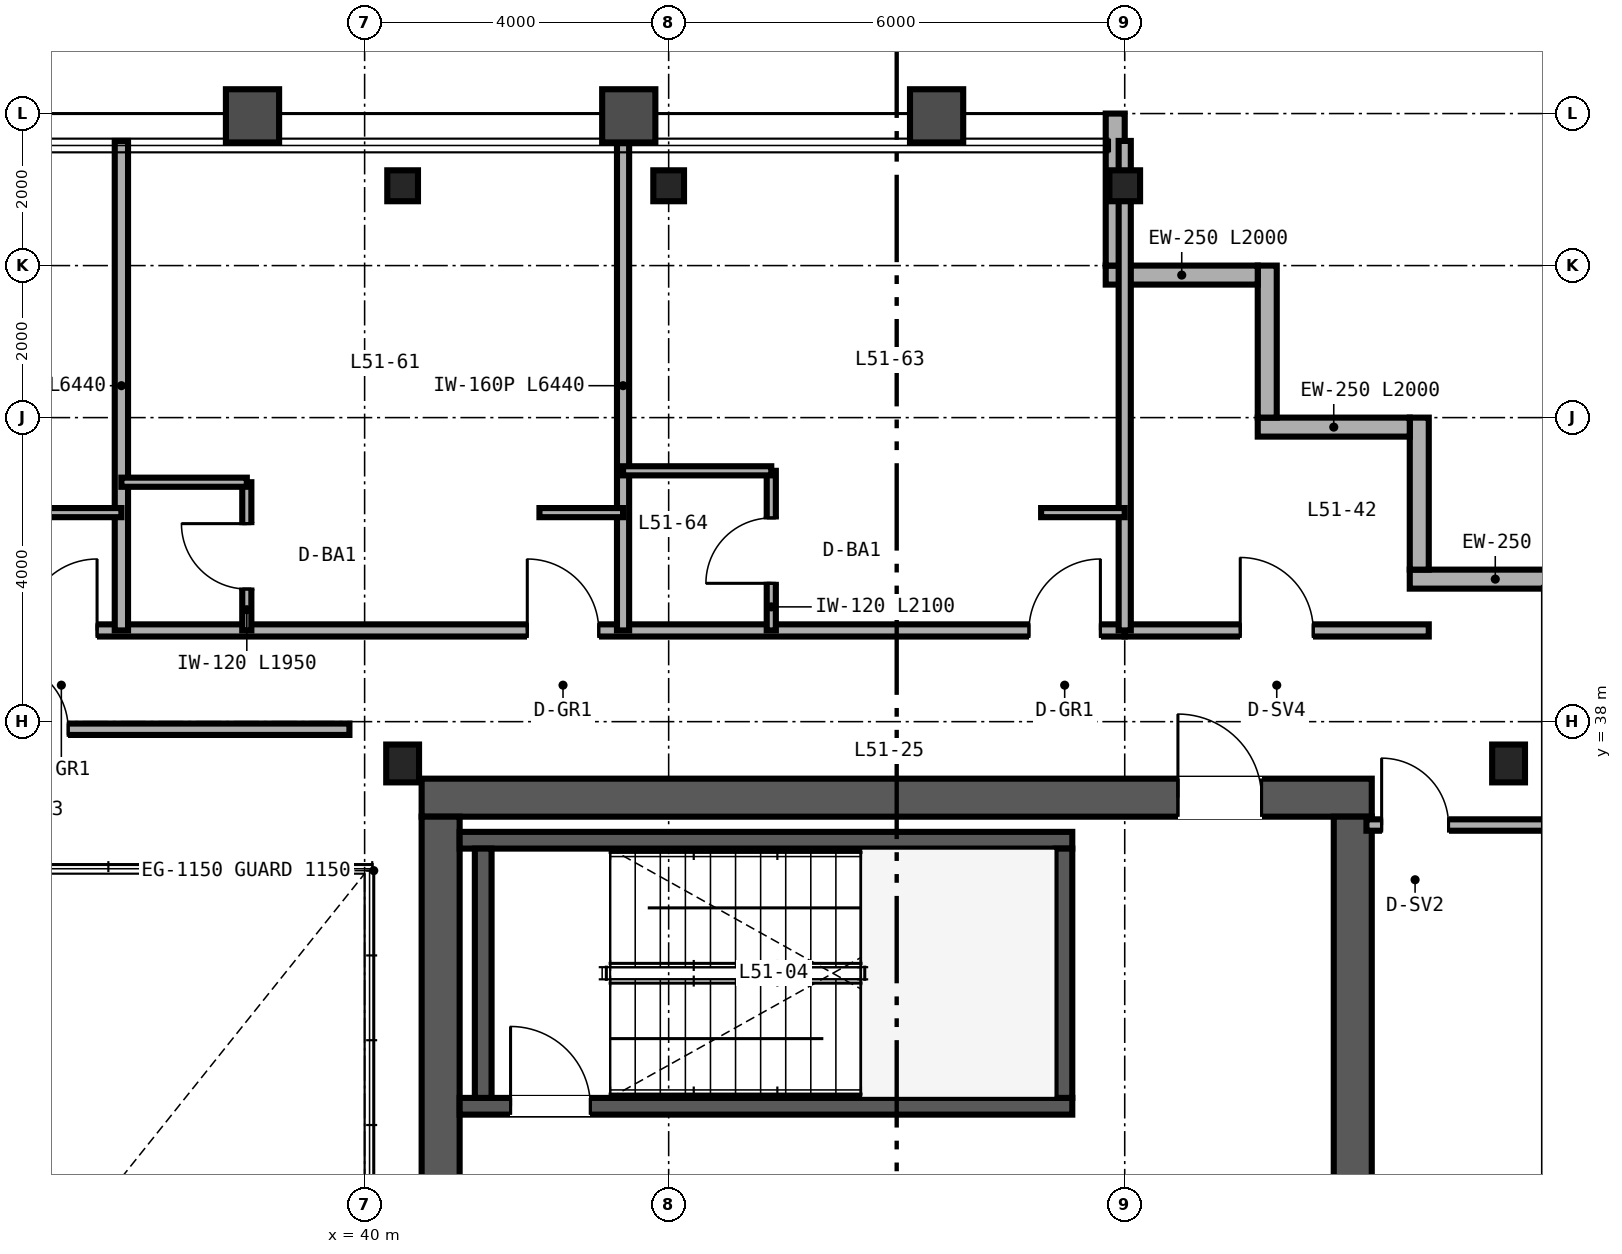
"""IFC4 building model, lengths in metres.
Left out: names, types, materials, properties, quantities, classifications, styles, units other than length and angle.
Written with IfcOpenShell. Run it as: python <this file> out.ifc"""

import sys

from ifc_helpers import new_model, si_unit, direction, frame, frame_2d, origin, origin_2d, place, context, subcontext, project, spatial, rectangle, i_section, extrude, source, transform, mapped, element, fill, save


model = new_model("IFC4")
c1 = context("Model", 3, precision=1e-05, world=origin(), true_north=direction((0.0, 1.0)))
c2 = subcontext(c1, "Body", "Model", "MODEL_VIEW")
j1 = project(units=[si_unit("LENGTHUNIT", "METRE"), si_unit("PLANEANGLEUNIT", "RADIAN")], contexts=[c1])
p1 = place(None, origin())
s1 = spatial("IfcSite", under=j1, at=p1, CompositionType="ELEMENT")
p2 = place(p1, origin())
s2 = spatial("IfcBuilding", under=s1, at=p2, CompositionType="ELEMENT")
p3 = place(p2, frame((0.0, 0.0, 202.8)))
s3 = spatial("IfcBuildingStorey", under=s2, at=p3, CompositionType="ELEMENT", Elevation=202.8)
p4 = place(p3, frame((40.75, 37.0, 0.0), z_axis=(0.0, 0.0, 1.0), x_axis=(1.0, 0.0, 0.0)))
e1 = element("IfcWall", 1, at=p4, inside=s3, PredefinedType="SHEAR", context=c2, shape_type="SweptSolid", body=[
    extrude(rectangle(XDim=12.5, YDim=0.5, at=frame_2d((6.25, 0.0))), origin(), (0.0, 0.0, 1.0), 3.37),
])
p5 = place(p4, frame((9.95, 0.0, 0.0)))
e2 = element("IfcOpeningElement", 2, at=p5, cuts=e1, PredefinedType="OPENING", context=c2, shape_type="SweptSolid", body=[
    extrude(rectangle(XDim=1.1, YDim=2.15, at=frame_2d((0.55, 1.075))), frame((0.0, 0.26, 0.0), z_axis=(0.0, -1.0, 0.0), x_axis=(1.0, 0.0, 0.0)), (0.0, 0.0, 1.0), 0.52),
])
for number, where, z_axis, x_axis in (
    (3, (41.0, 15.25, 0.0), (0.0, 0.0, 1.0), (0.0, 1.0, 0.0)),
    (4, (53.0, 15.25, 0.0), (0.0, 0.0, 1.0), (0.0, 1.0, 0.0)),
):
    element("IfcWall", number, at=place(p3, frame(where, z_axis=z_axis, x_axis=x_axis)), inside=s3, PredefinedType="SHEAR", context=c2, shape_type="SweptSolid", body=[
        extrude(rectangle(XDim=21.5, YDim=0.5, at=frame_2d((10.75, 0.0))), origin(), (0.0, 0.0, 1.0), 3.37),
    ])
p6 = place(p3, frame((41.25, 32.94, 0.0), z_axis=(0.0, 0.0, 1.0), x_axis=(1.0, 0.0, 0.0)))
e5 = element("IfcWall", 5, at=p6, inside=s3, PredefinedType="SHEAR", context=c2, shape_type="SweptSolid", body=[
    extrude(rectangle(XDim=8.06, YDim=0.22, at=frame_2d((4.03, 0.0))), origin(), (0.0, 0.0, 1.0), 3.4),
])
p7 = place(p6, frame((0.67, 0.0, 0.0)))
e6 = element("IfcOpeningElement", 6, at=p7, cuts=e5, PredefinedType="OPENING", context=c2, shape_type="SweptSolid", body=[
    extrude(rectangle(XDim=1.05, YDim=2.15, at=frame_2d((0.525, 1.075))), frame((0.0, 0.12, 0.0), z_axis=(0.0, -1.0, 0.0), x_axis=(1.0, 0.0, 0.0)), (0.0, 0.0, 1.0), 0.24),
])
p8 = place(p3, frame((41.25, 36.44, 0.0), z_axis=(0.0, 0.0, 1.0), x_axis=(1.0, 0.0, 0.0)))
e7 = element("IfcWall", 7, at=p8, inside=s3, PredefinedType="SHEAR", context=c2, shape_type="SweptSolid", body=[
    extrude(rectangle(XDim=8.06, YDim=0.22, at=frame_2d((4.03, 0.0))), origin(), (0.0, 0.0, 1.0), 3.4),
])
for number, where, z_axis, x_axis in (
    (8, (41.56, 33.05, 0.0), (0.0, 0.0, 1.0), (0.0, 1.0, 0.0)),
    (9, (49.2, 33.05, 0.0), (0.0, 0.0, 1.0), (0.0, 1.0, 0.0)),
):
    element("IfcWall", number, at=place(p3, frame(where, z_axis=z_axis, x_axis=x_axis)), inside=s3, PredefinedType="SHEAR", context=c2, shape_type="SweptSolid", body=[
        extrude(rectangle(XDim=3.28, YDim=0.22, at=frame_2d((1.64, 0.0))), origin(), (0.0, 0.0, 1.0), 3.4),
    ])
m1 = source(origin(), c2, "Body", "SweptSolid", [
    extrude(i_section(OverallWidth=0.432, OverallDepth=0.498, WebThickness=0.056, FlangeThickness=0.089, FilletRadius=0.025, at=origin_2d()), origin(), (0.0, 0.0, 1.0), 3.37),
])
for number, where, z_axis, x_axis in (
    (10, (40.5, 37.45, 0.0), (0.0, 0.0, 1.0), (1.0, 0.0, 0.0)),
    (11, (55.05, 37.45, 0.0), (0.0, 0.0, 1.0), (1.0, 0.0, 0.0)),
):
    element("IfcColumn", number, at=place(p3, frame(where, z_axis=z_axis, x_axis=x_axis)), inside=s3, PredefinedType="COLUMN", context=c2, shape_type="MappedRepresentation", body=[
        mapped(m1, transform((0.0, 0.0, 0.0), scale=1.0)),
    ])
m2 = source(origin(), c2, "Body", "SweptSolid", [
    extrude(i_section(OverallWidth=0.404, OverallDepth=0.407, WebThickness=0.027, FlangeThickness=0.044, FilletRadius=0.025, at=origin_2d()), origin(), (0.0, 0.0, 1.0), 3.37),
])
for number, where, z_axis, x_axis in (
    (12, (40.5, 45.05, 0.0), (0.0, 0.0, 1.0), (1.0, 0.0, 0.0)),
    (13, (44.0, 45.05, 0.0), (0.0, 0.0, 1.0), (1.0, 0.0, 0.0)),
    (14, (50.0, 45.05, 0.0), (0.0, 0.0, 1.0), (1.0, 0.0, 0.0)),
):
    element("IfcColumn", number, at=place(p3, frame(where, z_axis=z_axis, x_axis=x_axis)), inside=s3, PredefinedType="COLUMN", context=c2, shape_type="MappedRepresentation", body=[
        mapped(m2, transform((0.0, 0.0, 0.0), scale=1.0)),
    ])
p9 = place(p3, frame((56.0, 39.875, 0.0), z_axis=(0.0, 0.0, 1.0), x_axis=(-1.0, 0.0, 0.0)))
e15 = element("IfcWall", 15, at=p9, inside=s3, PredefinedType="SOLIDWALL", context=c2, shape_type="SweptSolid", body=[
    extrude(rectangle(XDim=2.25, YDim=0.25, at=frame_2d((1.125, 0.0))), origin(), (0.0, 0.0, 1.0), 3.37),
])
for number, where, z_axis, x_axis in (
    (16, (53.875, 40.0, 0.0), (0.0, 0.0, 1.0), (0.0, 1.0, 0.0)),
    (17, (53.75, 41.875, 0.0), (0.0, 0.0, 1.0), (-1.0, 0.0, 0.0)),
    (18, (51.875, 42.0, 0.0), (0.0, 0.0, 1.0), (0.0, 1.0, 0.0)),
    (19, (51.75, 43.875, 0.0), (0.0, 0.0, 1.0), (-1.0, 0.0, 0.0)),
):
    element("IfcWall", number, at=place(p3, frame(where, z_axis=z_axis, x_axis=x_axis)), inside=s3, PredefinedType="SOLIDWALL", context=c2, shape_type="SweptSolid", body=[
        extrude(rectangle(XDim=2.0, YDim=0.25, at=frame_2d((1.0, 0.0))), origin(), (0.0, 0.0, 1.0), 3.37),
    ])
p10 = place(p3, frame((49.875, 44.0, 0.0), z_axis=(0.0, 0.0, 1.0), x_axis=(0.0, 1.0, 0.0)))
e20 = element("IfcWall", 20, at=p10, inside=s3, PredefinedType="SOLIDWALL", context=c2, shape_type="SweptSolid", body=[
    extrude(rectangle(XDim=2.0, YDim=0.25, at=frame_2d((1.0, 0.0))), origin(), (0.0, 0.0, 1.0), 2.677),
])
p11 = place(p3, frame((24.2, 37.9, 0.0), z_axis=(0.0, 0.0, 1.0), x_axis=(1.0, 0.0, 0.0)))
e21 = element("IfcWall", 21, at=p11, inside=s3, PredefinedType="PARTITIONING", context=c2, shape_type="SweptSolid", body=[
    extrude(rectangle(XDim=15.6, YDim=0.15, at=frame_2d((7.8, 0.0))), origin(), (0.0, 0.0, 1.0), 3.37),
])
p12 = place(p11, frame((3.0, 0.0, 0.0)))
e22 = element("IfcOpeningElement", 22, at=p12, cuts=e21, PredefinedType="OPENING", context=c2, shape_type="SweptSolid", body=[
    extrude(rectangle(XDim=0.9, YDim=2.15, at=frame_2d((0.45, 1.075))), frame((0.0, 0.085, 0.0), z_axis=(0.0, -1.0, 0.0), x_axis=(1.0, 0.0, 0.0)), (0.0, 0.0, 1.0), 0.17),
])
p13 = place(p11, frame((11.0, 0.0, 0.0)))
e23 = element("IfcOpeningElement", 23, at=p13, cuts=e21, PredefinedType="OPENING", context=c2, shape_type="SweptSolid", body=[
    extrude(rectangle(XDim=0.9, YDim=2.15, at=frame_2d((0.45, 1.075))), frame((0.0, 0.085, 0.0), z_axis=(0.0, -1.0, 0.0), x_axis=(1.0, 0.0, 0.0)), (0.0, 0.0, 1.0), 0.17),
])
p14 = place(p3, frame((53.18, 36.64, 0.0), z_axis=(0.0, 0.0, 1.0), x_axis=(1.0, 0.0, 0.0)))
e24 = element("IfcWall", 24, at=p14, inside=s3, PredefinedType="PARTITIONING", context=c2, shape_type="SweptSolid", body=[
    extrude(rectangle(XDim=2.66, YDim=0.15, at=frame_2d((1.33, 0.0))), origin(), (0.0, 0.0, 1.0), 2.753),
])
p15 = place(p14, frame((0.2, 0.0, 0.0)))
e25 = element("IfcOpeningElement", 25, at=p15, cuts=e24, PredefinedType="OPENING", context=c2, shape_type="SweptSolid", body=[
    extrude(rectangle(XDim=0.88, YDim=2.15, at=frame_2d((0.44, 1.075))), frame((0.0, 0.085, 0.0), z_axis=(0.0, -1.0, 0.0), x_axis=(1.0, 0.0, 0.0)), (0.0, 0.0, 1.0), 0.17),
])
p16 = place(p3, frame((50.0, 39.2, 0.0), z_axis=(0.0, 0.0, 1.0), x_axis=(1.0, 0.0, 0.0)))
e26 = element("IfcWall", 26, at=p16, inside=s3, PredefinedType="PARTITIONING", context=c2, shape_type="SweptSolid", body=[
    extrude(rectangle(XDim=4.0, YDim=0.16, at=frame_2d((2.0, 0.0))), origin(), (0.0, 0.0, 1.0), 3.37),
])
p17 = place(p16, frame((1.52, 0.0, 0.0)))
e27 = element("IfcOpeningElement", 27, at=p17, cuts=e26, PredefinedType="OPENING", context=c2, shape_type="SweptSolid", body=[
    extrude(rectangle(XDim=0.96, YDim=2.15, at=frame_2d((0.48, 1.075))), frame((0.0, 0.09, 0.0), z_axis=(0.0, -1.0, 0.0), x_axis=(1.0, 0.0, 0.0)), (0.0, 0.0, 1.0), 0.18),
])
p18 = place(p3, frame((14.0, 39.2, 0.0), z_axis=(0.0, 0.0, 1.0), x_axis=(1.0, 0.0, 0.0)))
e28 = element("IfcWall", 28, at=p18, inside=s3, PredefinedType="PARTITIONING", context=c2, shape_type="SweptSolid", body=[
    extrude(rectangle(XDim=36.0, YDim=0.16, at=frame_2d((18.0, 0.0))), origin(), (0.0, 0.0, 1.0), 2.913),
])
p19 = place(p18, frame((4.14, 0.0, 0.0)))
e29 = element("IfcOpeningElement", 29, at=p19, cuts=e28, PredefinedType="OPENING", context=c2, shape_type="SweptSolid", body=[
    extrude(rectangle(XDim=0.94, YDim=2.15, at=frame_2d((0.47, 1.075))), frame((0.0, 0.09, 0.0), z_axis=(0.0, -1.0, 0.0), x_axis=(1.0, 0.0, 0.0)), (0.0, 0.0, 1.0), 0.18),
])
p20 = place(p18, frame((9.54, 0.0, 0.0)))
e30 = element("IfcOpeningElement", 30, at=p20, cuts=e28, PredefinedType="OPENING", context=c2, shape_type="SweptSolid", body=[
    extrude(rectangle(XDim=0.94, YDim=2.15, at=frame_2d((0.47, 1.075))), frame((0.0, 0.09, 0.0), z_axis=(0.0, -1.0, 0.0), x_axis=(1.0, 0.0, 0.0)), (0.0, 0.0, 1.0), 0.18),
])
p21 = place(p18, frame((13.32, 0.0, 0.0)))
e31 = element("IfcOpeningElement", 31, at=p21, cuts=e28, PredefinedType="OPENING", context=c2, shape_type="SweptSolid", body=[
    extrude(rectangle(XDim=0.96, YDim=2.15, at=frame_2d((0.48, 1.075))), frame((0.0, 0.09, 0.0), z_axis=(0.0, -1.0, 0.0), x_axis=(1.0, 0.0, 0.0)), (0.0, 0.0, 1.0), 0.18),
])
p22 = place(p18, frame((21.54, 0.0, 0.0)))
e32 = element("IfcOpeningElement", 32, at=p22, cuts=e28, PredefinedType="OPENING", context=c2, shape_type="SweptSolid", body=[
    extrude(rectangle(XDim=0.94, YDim=2.15, at=frame_2d((0.47, 1.075))), frame((0.0, 0.09, 0.0), z_axis=(0.0, -1.0, 0.0), x_axis=(1.0, 0.0, 0.0)), (0.0, 0.0, 1.0), 0.18),
])
p23 = place(p18, frame((28.14, 0.0, 0.0)))
e33 = element("IfcOpeningElement", 33, at=p23, cuts=e28, PredefinedType="OPENING", context=c2, shape_type="SweptSolid", body=[
    extrude(rectangle(XDim=0.94, YDim=2.15, at=frame_2d((0.47, 1.075))), frame((0.0, 0.09, 0.0), z_axis=(0.0, -1.0, 0.0), x_axis=(1.0, 0.0, 0.0)), (0.0, 0.0, 1.0), 0.18),
])
p24 = place(p18, frame((34.74, 0.0, 0.0)))
e34 = element("IfcOpeningElement", 34, at=p24, cuts=e28, PredefinedType="OPENING", context=c2, shape_type="SweptSolid", body=[
    extrude(rectangle(XDim=0.94, YDim=2.15, at=frame_2d((0.47, 1.075))), frame((0.0, 0.09, 0.0), z_axis=(0.0, -1.0, 0.0), x_axis=(1.0, 0.0, 0.0)), (0.0, 0.0, 1.0), 0.18),
])
p25 = place(p3, frame((50.0, 39.2, 0.0), z_axis=(0.0, 0.0, 1.0), x_axis=(0.0, 1.0, 0.0)))
e35 = element("IfcWall", 35, at=p25, inside=s3, PredefinedType="PARTITIONING", context=c2, shape_type="SweptSolid", body=[
    extrude(rectangle(XDim=6.44, YDim=0.16, at=frame_2d((3.22, 0.0))), origin(), (0.0, 0.0, 1.0), 2.677),
])
p26 = place(p3, frame((36.8, 39.2, 0.0), z_axis=(0.0, 0.0, 1.0), x_axis=(0.0, 1.0, 0.0)))
e36 = element("IfcWall", 36, at=p26, inside=s3, PredefinedType="PARTITIONING", context=c2, shape_type="SweptSolid", body=[
    extrude(rectangle(XDim=6.44, YDim=0.175, at=frame_2d((3.22, 0.0))), origin(), (0.0, 0.0, 1.0), 2.443),
])
p27 = place(p3, frame((35.7, 40.75, 0.0), z_axis=(0.0, 0.0, 1.0), x_axis=(1.0, 0.0, 0.0)))
e37 = element("IfcWall", 37, at=p27, inside=s3, PredefinedType="PARTITIONING", context=c2, shape_type="SweptSolid", body=[
    extrude(rectangle(XDim=1.1, YDim=0.12, at=frame_2d((0.55, 0.0))), origin(), (0.0, 0.0, 1.0), 3.37),
])
p28 = place(p3, frame((43.4, 39.2, 0.0), z_axis=(0.0, 0.0, 1.0), x_axis=(0.0, 1.0, 0.0)))
e38 = element("IfcWall", 38, at=p28, inside=s3, PredefinedType="PARTITIONING", context=c2, shape_type="SweptSolid", body=[
    extrude(rectangle(XDim=6.44, YDim=0.16, at=frame_2d((3.22, 0.0))), origin(), (0.0, 0.0, 1.0), 2.833),
])
p29 = place(p3, frame((38.45, 39.2, 0.0), z_axis=(0.0, 0.0, 1.0), x_axis=(0.0, 1.0, 0.0)))
e39 = element("IfcWall", 39, at=p29, inside=s3, PredefinedType="PARTITIONING", context=c2, shape_type="SweptSolid", body=[
    extrude(rectangle(XDim=1.95, YDim=0.12, at=frame_2d((0.975, 0.0))), origin(), (0.0, 0.0, 1.0), 3.37),
])
p30 = place(p29, frame((0.545, 0.0, 0.0)))
e40 = element("IfcOpeningElement", 40, at=p30, cuts=e39, PredefinedType="OPENING", context=c2, shape_type="SweptSolid", body=[
    extrude(rectangle(XDim=0.86, YDim=2.1, at=frame_2d((0.43, 1.05))), frame((0.0, 0.07, 0.0), z_axis=(0.0, -1.0, 0.0), x_axis=(1.0, 0.0, 0.0)), (0.0, 0.0, 1.0), 0.14),
])
p31 = place(p3, frame((36.8, 41.15, 0.0), z_axis=(0.0, 0.0, 1.0), x_axis=(1.0, 0.0, 0.0)))
e41 = element("IfcWall", 41, at=p31, inside=s3, PredefinedType="PARTITIONING", context=c2, shape_type="SweptSolid", body=[
    extrude(rectangle(XDim=1.65, YDim=0.12, at=frame_2d((0.825, 0.0))), origin(), (0.0, 0.0, 1.0), 3.37),
])
p32 = place(p3, frame((42.3, 40.75, 0.0), z_axis=(0.0, 0.0, 1.0), x_axis=(1.0, 0.0, 0.0)))
e42 = element("IfcWall", 42, at=p32, inside=s3, PredefinedType="PARTITIONING", context=c2, shape_type="SweptSolid", body=[
    extrude(rectangle(XDim=1.1, YDim=0.12, at=frame_2d((0.55, 0.0))), origin(), (0.0, 0.0, 1.0), 3.37),
])
p33 = place(p3, frame((45.35, 39.2, 0.0), z_axis=(0.0, 0.0, 1.0), x_axis=(0.0, 1.0, 0.0)))
e43 = element("IfcWall", 43, at=p33, inside=s3, PredefinedType="PARTITIONING", context=c2, shape_type="SweptSolid", body=[
    extrude(rectangle(XDim=2.1, YDim=0.12, at=frame_2d((1.05, 0.0))), origin(), (0.0, 0.0, 1.0), 3.37),
])
p34 = place(p33, frame((0.62, 0.0, 0.0)))
e44 = element("IfcOpeningElement", 44, at=p34, cuts=e43, PredefinedType="OPENING", context=c2, shape_type="SweptSolid", body=[
    extrude(rectangle(XDim=0.86, YDim=2.1, at=frame_2d((0.43, 1.05))), frame((0.0, 0.07, 0.0), z_axis=(0.0, -1.0, 0.0), x_axis=(1.0, 0.0, 0.0)), (0.0, 0.0, 1.0), 0.14),
])
p35 = place(p3, frame((43.4, 41.3, 0.0), z_axis=(0.0, 0.0, 1.0), x_axis=(1.0, 0.0, 0.0)))
e45 = element("IfcWall", 45, at=p35, inside=s3, PredefinedType="PARTITIONING", context=c2, shape_type="SweptSolid", body=[
    extrude(rectangle(XDim=1.95, YDim=0.12, at=frame_2d((0.975, 0.0))), origin(), (0.0, 0.0, 1.0), 3.37),
])
p36 = place(p3, frame((48.9, 40.75, 0.0), z_axis=(0.0, 0.0, 1.0), x_axis=(1.0, 0.0, 0.0)))
e46 = element("IfcWall", 46, at=p36, inside=s3, PredefinedType="PARTITIONING", context=c2, shape_type="SweptSolid", body=[
    extrude(rectangle(XDim=1.1, YDim=0.12, at=frame_2d((0.55, 0.0))), origin(), (0.0, 0.0, 1.0), 3.37),
])
m3 = source(origin(), c2, "Body", "SweptSolid", [
    extrude(rectangle(XDim=1.05, YDim=2.15, at=frame_2d((0.525, 1.075))), frame((0.0, 0.025, 0.0), z_axis=(0.0, -1.0, 0.0), x_axis=(1.0, 0.0, 0.0)), (0.0, 0.0, 1.0), 0.05),
])
p37 = place(p7, origin())
e47 = element("IfcDoor", 47, at=p37, inside=s3, OperationType="SINGLE_SWING_LEFT", PredefinedType="DOOR", context=c2, shape_type="MappedRepresentation", body=[
    mapped(m3, transform((0.0, 0.0, 0.0), scale=1.0)),
])
fill(e6, e47)
m4 = source(origin(), c2, "Body", "SweptSolid", [
    extrude(rectangle(XDim=1.1, YDim=2.15, at=frame_2d((0.55, 1.075))), frame((0.0, 0.025, 0.0), z_axis=(0.0, -1.0, 0.0), x_axis=(1.0, 0.0, 0.0)), (0.0, 0.0, 1.0), 0.05),
])
p38 = place(p5, origin())
e48 = element("IfcDoor", 48, at=p38, inside=s3, OperationType="SINGLE_SWING_LEFT", PredefinedType="DOOR", context=c2, shape_type="MappedRepresentation", body=[
    mapped(m4, transform((0.0, 0.0, 0.0), scale=1.0)),
])
fill(e2, e48)
m5 = source(origin(), c2, "Body", "SweptSolid", [
    extrude(rectangle(XDim=0.9, YDim=2.15, at=frame_2d((0.45, 1.075))), frame((0.0, 0.025, 0.0), z_axis=(0.0, -1.0, 0.0), x_axis=(1.0, 0.0, 0.0)), (0.0, 0.0, 1.0), 0.05),
])
p39 = place(p13, origin())
e49 = element("IfcDoor", 49, at=p39, inside=s3, OperationType="SINGLE_SWING_LEFT", PredefinedType="DOOR", context=c2, shape_type="MappedRepresentation", body=[
    mapped(m5, transform((0.0, 0.0, 0.0), scale=1.0)),
])
fill(e23, e49)
m6 = source(origin(), c2, "Body", "SweptSolid", [
    extrude(rectangle(XDim=0.88, YDim=2.15, at=frame_2d((0.44, 1.075))), frame((0.0, 0.025, 0.0), z_axis=(0.0, -1.0, 0.0), x_axis=(1.0, 0.0, 0.0)), (0.0, 0.0, 1.0), 0.05),
])
p40 = place(p15, origin())
e50 = element("IfcDoor", 50, at=p40, inside=s3, OperationType="SINGLE_SWING_LEFT", PredefinedType="DOOR", context=c2, shape_type="MappedRepresentation", body=[
    mapped(m6, transform((0.0, 0.0, 0.0), scale=1.0)),
])
fill(e25, e50)
m7 = source(origin(), c2, "Body", "SweptSolid", [
    extrude(rectangle(XDim=0.96, YDim=2.15, at=frame_2d((0.48, 1.075))), frame((0.0, 0.025, 0.0), z_axis=(0.0, -1.0, 0.0), x_axis=(1.0, 0.0, 0.0)), (0.0, 0.0, 1.0), 0.05),
])
p41 = place(p17, origin())
e51 = element("IfcDoor", 51, at=p41, inside=s3, OperationType="SINGLE_SWING_LEFT", PredefinedType="DOOR", context=c2, shape_type="MappedRepresentation", body=[
    mapped(m7, transform((0.0, 0.0, 0.0), scale=1.0)),
])
fill(e27, e51)
m8 = source(origin(), c2, "Body", "SweptSolid", [
    extrude(rectangle(XDim=0.86, YDim=2.1, at=frame_2d((0.43, 1.05))), frame((0.0, 0.025, 0.0), z_axis=(0.0, -1.0, 0.0), x_axis=(1.0, 0.0, 0.0)), (0.0, 0.0, 1.0), 0.05),
])
p42 = place(p30, origin())
e52 = element("IfcDoor", 52, at=p42, inside=s3, OperationType="SINGLE_SWING_RIGHT", PredefinedType="DOOR", context=c2, shape_type="MappedRepresentation", body=[
    mapped(m8, transform((0.0, 0.0, 0.0), scale=1.0)),
])
fill(e40, e52)
p43 = place(p34, origin())
e53 = element("IfcDoor", 53, at=p43, inside=s3, OperationType="SINGLE_SWING_LEFT", PredefinedType="DOOR", context=c2, shape_type="MappedRepresentation", body=[
    mapped(m8, transform((0.0, 0.0, 0.0), scale=1.0)),
])
fill(e44, e53)
m9 = source(origin(), c2, "Body", "SweptSolid", [
    extrude(rectangle(XDim=0.94, YDim=2.15, at=frame_2d((0.47, 1.075))), frame((0.0, 0.025, 0.0), z_axis=(0.0, -1.0, 0.0), x_axis=(1.0, 0.0, 0.0)), (0.0, 0.0, 1.0), 0.05),
])
p44 = place(p22, origin())
e54 = element("IfcDoor", 54, at=p44, inside=s3, OperationType="SINGLE_SWING_RIGHT", PredefinedType="DOOR", context=c2, shape_type="MappedRepresentation", body=[
    mapped(m9, transform((0.0, 0.0, 0.0), scale=1.0)),
])
fill(e32, e54)
p45 = place(p23, origin())
e55 = element("IfcDoor", 55, at=p45, inside=s3, OperationType="SINGLE_SWING_LEFT", PredefinedType="DOOR", context=c2, shape_type="MappedRepresentation", body=[
    mapped(m9, transform((0.0, 0.0, 0.0), scale=1.0)),
])
fill(e33, e55)
p46 = place(p24, origin())
e56 = element("IfcDoor", 56, at=p46, inside=s3, OperationType="SINGLE_SWING_RIGHT", PredefinedType="DOOR", context=c2, shape_type="MappedRepresentation", body=[
    mapped(m9, transform((0.0, 0.0, 0.0), scale=1.0)),
])
fill(e34, e56)
save(model, sys.argv[1])
